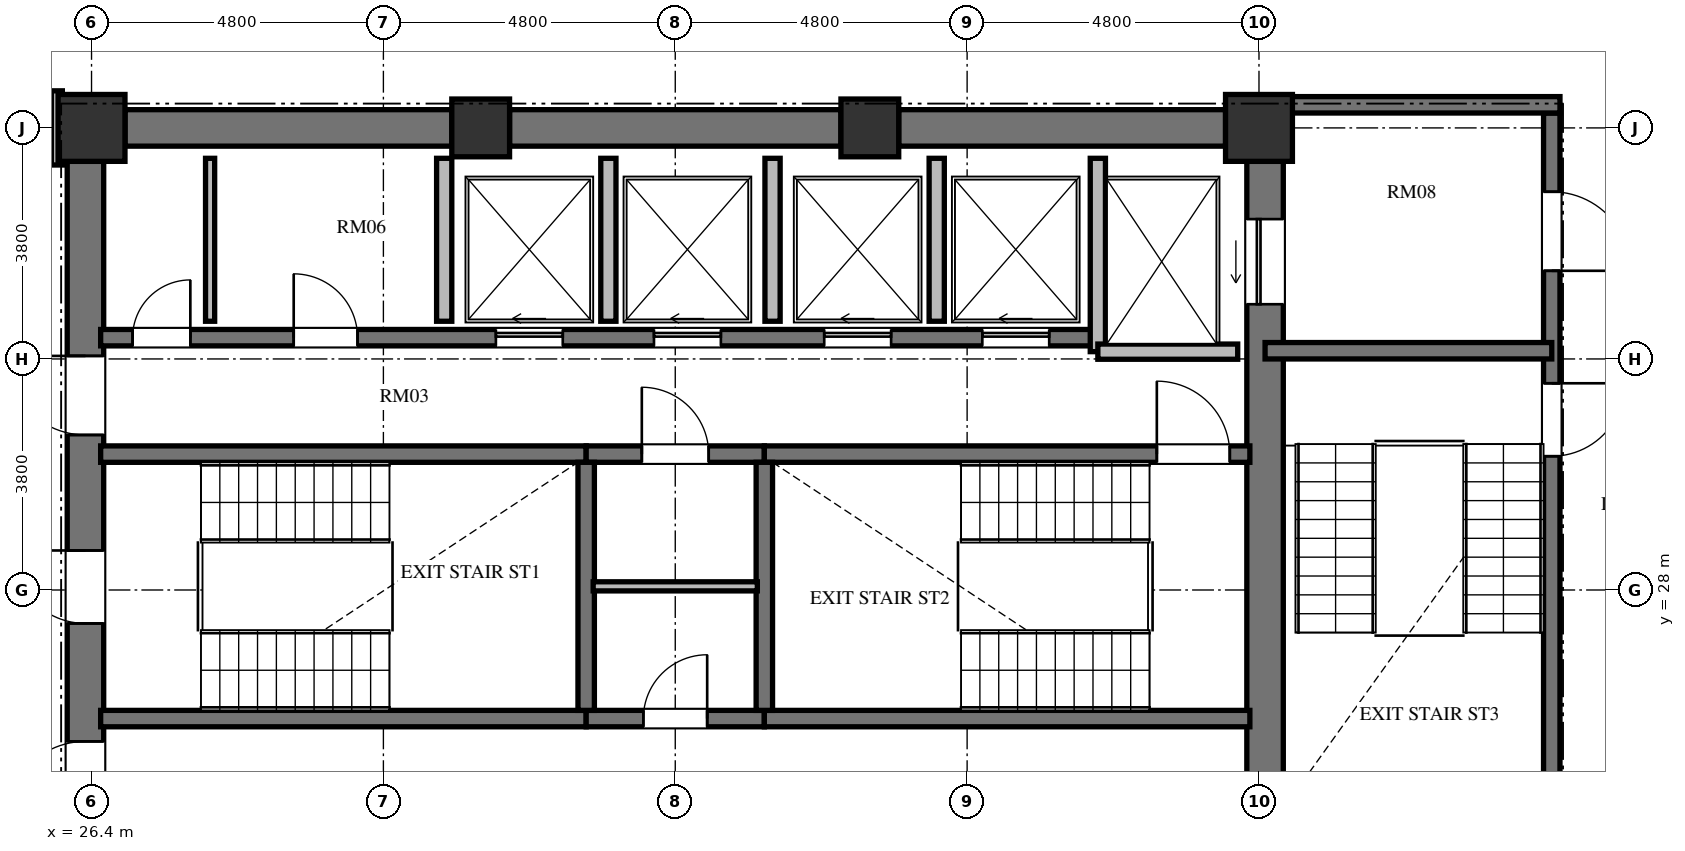
"""IFC4 building model, lengths in metres.
Left out: names, types, materials, properties, quantities, classifications, styles, units other than length and angle.
Written with IfcOpenShell. Run it as: python <this file> out.ifc"""

import sys

from ifc_helpers import new_model, si_unit, direction, frame, frame_2d, origin, origin_2d, place, context, subcontext, project, spatial, rectangle, extrude, element, fill, save


model = new_model("IFC4")
c1 = context("Model", 3, precision=1e-05, world=origin(), true_north=direction((0.0, 1.0)))
c2 = subcontext(c1, "Body", "Model", "MODEL_VIEW")
j1 = project(units=[si_unit("LENGTHUNIT", "METRE"), si_unit("PLANEANGLEUNIT", "RADIAN")], contexts=[c1])
p1 = place(None, origin())
s1 = spatial("IfcSite", under=j1, at=p1, CompositionType="ELEMENT")
p2 = place(p1, origin())
s2 = spatial("IfcBuilding", under=s1, at=p2, CompositionType="ELEMENT")
p3 = place(p2, frame((0.0, 0.0, 178.416)))
s3 = spatial("IfcBuildingStorey", under=s2, at=p3, CompositionType="ELEMENT", Elevation=178.416)
p4 = place(p3, frame((45.6, 35.6, 0.0), z_axis=(0.0, 0.0, 1.0), x_axis=(1.0, 0.0, 0.0)))
e1 = element("IfcColumn", 1, at=p4, inside=s3, PredefinedType="COLUMN", context=c2, shape_type="SweptSolid", body=[
    extrude(rectangle(XDim=1.1, YDim=1.1, at=origin_2d()), origin(), (0.0, 0.0, 1.0), 3.648),
])
for number, where, z_axis, x_axis in (
    (2, (39.2, 35.6, 0.0), (0.0, 0.0, 1.0), (1.0, 0.0, 0.0)),
    (3, (32.8, 35.6, 0.0), (0.0, 0.0, 1.0), (1.0, 0.0, 0.0)),
):
    element("IfcColumn", number, at=place(p3, frame(where, z_axis=z_axis, x_axis=x_axis)), inside=s3, PredefinedType="COLUMN", context=c2, shape_type="SweptSolid", body=[
        extrude(rectangle(XDim=0.95, YDim=0.95, at=origin_2d()), origin(), (0.0, 0.0, 1.0), 3.648),
    ])
p5 = place(p3, frame((26.4, 35.6, 0.0), z_axis=(0.0, 0.0, 1.0), x_axis=(1.0, 0.0, 0.0)))
e4 = element("IfcColumn", 4, at=p5, inside=s3, PredefinedType="COLUMN", context=c2, shape_type="SweptSolid", body=[
    extrude(rectangle(XDim=1.1, YDim=1.1, at=origin_2d()), origin(), (0.0, 0.0, 1.0), 3.648),
])
p6 = place(p3, frame((26.3, 20.95, 0.0), z_axis=(0.0, 0.0, 1.0), x_axis=(0.0, 1.0, 0.0)))
e5 = element("IfcWall", 5, at=p6, inside=s3, PredefinedType="SHEAR", context=c2, shape_type="SweptSolid", body=[
    extrude(rectangle(XDim=14.1, YDim=0.6, at=frame_2d((7.05, 0.0))), origin(), (0.0, 0.0, 1.0), 3.648),
])
p7 = place(p6, frame((6.5, 0.0, 0.0)))
e6 = element("IfcOpeningElement", 6, at=p7, cuts=e5, PredefinedType="OPENING", context=c2, shape_type="SweptSolid", body=[
    extrude(rectangle(XDim=1.2, YDim=2.15, at=frame_2d((0.6, 1.075))), frame((0.0, 0.31, 0.0), z_axis=(0.0, -1.0, 0.0), x_axis=(1.0, 0.0, 0.0)), (0.0, 0.0, 1.0), 0.62),
])
p8 = place(p6, frame((9.6, 0.0, 0.0)))
e7 = element("IfcOpeningElement", 7, at=p8, cuts=e5, PredefinedType="OPENING", context=c2, shape_type="SweptSolid", body=[
    extrude(rectangle(XDim=1.3, YDim=2.2, at=frame_2d((0.65, 1.1))), frame((0.0, 0.31, 0.0), z_axis=(0.0, -1.0, 0.0), x_axis=(1.0, 0.0, 0.0)), (0.0, 0.0, 1.0), 0.62),
])
p9 = place(p6, frame((3.26, 0.0, 0.0)))
e8 = element("IfcOpeningElement", 8, at=p9, cuts=e5, PredefinedType="OPENING", context=c2, shape_type="SweptSolid", body=[
    extrude(rectangle(XDim=1.3, YDim=2.2, at=frame_2d((0.65, 1.1))), frame((0.0, 0.31, 0.0), z_axis=(0.0, -1.0, 0.0), x_axis=(1.0, 0.0, 0.0)), (0.0, 0.0, 1.0), 0.62),
])
p10 = place(p3, frame((45.7, 20.95, 0.0), z_axis=(0.0, 0.0, 1.0), x_axis=(0.0, 1.0, 0.0)))
e9 = element("IfcWall", 9, at=p10, inside=s3, PredefinedType="SHEAR", context=c2, shape_type="SweptSolid", body=[
    extrude(rectangle(XDim=14.1, YDim=0.6, at=frame_2d((7.05, 0.0))), origin(), (0.0, 0.0, 1.0), 3.648),
])
p11 = place(p10, frame((11.75, 0.0, 0.0)))
e10 = element("IfcOpeningElement", 10, at=p11, cuts=e9, PredefinedType="OPENING", context=c2, shape_type="SweptSolid", body=[
    extrude(rectangle(XDim=1.4, YDim=2.3, at=frame_2d((0.7, 1.15))), frame((0.0, 0.31, 0.0), z_axis=(0.0, -1.0, 0.0), x_axis=(1.0, 0.0, 0.0)), (0.0, 0.0, 1.0), 0.62),
])
p12 = place(p10, frame((0.95, 0.0, 0.0)))
e11 = element("IfcOpeningElement", 11, at=p12, cuts=e9, PredefinedType="OPENING", context=c2, shape_type="SweptSolid", body=[
    extrude(rectangle(XDim=1.4, YDim=2.3, at=frame_2d((0.7, 1.15))), frame((0.0, 0.31, 0.0), z_axis=(0.0, -1.0, 0.0), x_axis=(1.0, 0.0, 0.0)), (0.0, 0.0, 1.0), 0.62),
])
p13 = place(p3, frame((26.95, 35.6, 0.0), z_axis=(0.0, 0.0, 1.0), x_axis=(1.0, 0.0, 0.0)))
e12 = element("IfcWall", 12, at=p13, inside=s3, PredefinedType="SHEAR", context=c2, shape_type="SweptSolid", body=[
    extrude(rectangle(XDim=5.375, YDim=0.6, at=frame_2d((2.688, 0.0))), origin(), (0.0, 0.0, 1.0), 3.648),
])
p14 = place(p3, frame((33.275, 35.6, 0.0), z_axis=(0.0, 0.0, 1.0), x_axis=(1.0, 0.0, 0.0)))
e13 = element("IfcWall", 13, at=p14, inside=s3, PredefinedType="SHEAR", context=c2, shape_type="SweptSolid", body=[
    extrude(rectangle(XDim=5.45, YDim=0.6, at=frame_2d((2.725, 0.0))), origin(), (0.0, 0.0, 1.0), 3.648),
])
p15 = place(p3, frame((39.675, 35.6, 0.0), z_axis=(0.0, 0.0, 1.0), x_axis=(1.0, 0.0, 0.0)))
e14 = element("IfcWall", 14, at=p15, inside=s3, PredefinedType="SHEAR", context=c2, shape_type="SweptSolid", body=[
    extrude(rectangle(XDim=5.375, YDim=0.6, at=frame_2d((2.688, 0.0))), origin(), (0.0, 0.0, 1.0), 3.648),
])
p16 = place(p3, frame((26.55, 30.235, 0.0), z_axis=(0.0, 0.0, 1.0), x_axis=(1.0, 0.0, 0.0)))
e15 = element("IfcWall", 15, at=p16, inside=s3, PredefinedType="SHEAR", context=c2, shape_type="SweptSolid", body=[
    extrude(rectangle(XDim=7.985, YDim=0.27, at=frame_2d((3.992, 0.0))), origin(), (0.0, 0.0, 1.0), 3.648),
])
p17 = place(p3, frame((34.535, 30.235, 0.0), z_axis=(0.0, 0.0, 1.0), x_axis=(1.0, 0.0, 0.0)))
e16 = element("IfcWall", 16, at=p17, inside=s3, PredefinedType="SHEAR", context=c2, shape_type="SweptSolid", body=[
    extrude(rectangle(XDim=2.93, YDim=0.27, at=frame_2d((1.465, 0.0))), origin(), (0.0, 0.0, 1.0), 3.648),
])
p18 = place(p17, frame((0.915, 0.0, 0.0)))
e17 = element("IfcOpeningElement", 17, at=p18, cuts=e16, PredefinedType="OPENING", context=c2, shape_type="SweptSolid", body=[
    extrude(rectangle(XDim=1.1, YDim=2.15, at=frame_2d((0.55, 1.075))), frame((0.0, 0.145, 0.0), z_axis=(0.0, -1.0, 0.0), x_axis=(1.0, 0.0, 0.0)), (0.0, 0.0, 1.0), 0.29),
])
p19 = place(p3, frame((37.465, 30.235, 0.0), z_axis=(0.0, 0.0, 1.0), x_axis=(1.0, 0.0, 0.0)))
e18 = element("IfcWall", 18, at=p19, inside=s3, PredefinedType="SHEAR", context=c2, shape_type="SweptSolid", body=[
    extrude(rectangle(XDim=7.985, YDim=0.27, at=frame_2d((3.992, 0.0))), origin(), (0.0, 0.0, 1.0), 3.648),
])
p20 = place(p19, frame((6.455, 0.0, 0.0)))
e19 = element("IfcOpeningElement", 19, at=p20, cuts=e18, PredefinedType="OPENING", context=c2, shape_type="SweptSolid", body=[
    extrude(rectangle(XDim=1.2, YDim=2.15, at=frame_2d((0.6, 1.075))), frame((0.0, 0.145, 0.0), z_axis=(0.0, -1.0, 0.0), x_axis=(1.0, 0.0, 0.0)), (0.0, 0.0, 1.0), 0.29),
])
p21 = place(p3, frame((26.55, 25.885, 0.0), z_axis=(0.0, 0.0, 1.0), x_axis=(1.0, 0.0, 0.0)))
e20 = element("IfcWall", 20, at=p21, inside=s3, PredefinedType="SHEAR", context=c2, shape_type="SweptSolid", body=[
    extrude(rectangle(XDim=7.985, YDim=0.27, at=frame_2d((3.992, 0.0))), origin(), (0.0, 0.0, 1.0), 3.648),
])
p22 = place(p3, frame((34.535, 25.885, 0.0), z_axis=(0.0, 0.0, 1.0), x_axis=(1.0, 0.0, 0.0)))
e21 = element("IfcWall", 21, at=p22, inside=s3, PredefinedType="SHEAR", context=c2, shape_type="SweptSolid", body=[
    extrude(rectangle(XDim=2.93, YDim=0.27, at=frame_2d((1.465, 0.0))), origin(), (0.0, 0.0, 1.0), 3.648),
])
p23 = place(p22, frame((0.94, 0.0, 0.0)))
e22 = element("IfcOpeningElement", 22, at=p23, cuts=e21, PredefinedType="OPENING", context=c2, shape_type="SweptSolid", body=[
    extrude(rectangle(XDim=1.05, YDim=2.15, at=frame_2d((0.525, 1.075))), frame((0.0, 0.145, 0.0), z_axis=(0.0, -1.0, 0.0), x_axis=(1.0, 0.0, 0.0)), (0.0, 0.0, 1.0), 0.29),
])
p24 = place(p3, frame((37.465, 25.885, 0.0), z_axis=(0.0, 0.0, 1.0), x_axis=(1.0, 0.0, 0.0)))
e23 = element("IfcWall", 23, at=p24, inside=s3, PredefinedType="SHEAR", context=c2, shape_type="SweptSolid", body=[
    extrude(rectangle(XDim=7.985, YDim=0.27, at=frame_2d((3.992, 0.0))), origin(), (0.0, 0.0, 1.0), 3.648),
])
for number, where, z_axis, x_axis in (
    (24, (34.535, 26.02, 0.0), (0.0, 0.0, 1.0), (0.0, 1.0, 0.0)),
    (25, (37.465, 26.02, 0.0), (0.0, 0.0, 1.0), (0.0, 1.0, 0.0)),
):
    element("IfcWall", number, at=place(p3, frame(where, z_axis=z_axis, x_axis=x_axis)), inside=s3, PredefinedType="SHEAR", context=c2, shape_type="SweptSolid", body=[
        extrude(rectangle(XDim=4.08, YDim=0.27, at=frame_2d((2.04, 0.0))), origin(), (0.0, 0.0, 1.0), 3.648),
    ])
p25 = place(p3, frame((34.65, 28.06, 0.0), z_axis=(0.0, 0.0, 1.0), x_axis=(1.0, 0.0, 0.0)))
e26 = element("IfcWall", 26, at=p25, inside=s3, PredefinedType="PARTITIONING", context=c2, shape_type="SweptSolid", body=[
    extrude(rectangle(XDim=2.7, YDim=0.15, at=frame_2d((1.35, 0.0))), origin(), (0.0, 0.0, 1.0), 3.428),
])
p26 = place(p3, frame((26.55, 32.15, 0.0), z_axis=(0.0, 0.0, 1.0), x_axis=(1.0, 0.0, 0.0)))
e27 = element("IfcWall", 27, at=p26, inside=s3, PredefinedType="SHEAR", context=c2, shape_type="SweptSolid", body=[
    extrude(rectangle(XDim=16.4, YDim=0.27, at=frame_2d((8.2, 0.0))), origin(), (0.0, 0.0, 1.0), 3.648),
])
p27 = place(p26, frame((0.525, 0.0, 0.0)))
e28 = element("IfcOpeningElement", 28, at=p27, cuts=e27, PredefinedType="OPENING", context=c2, shape_type="SweptSolid", body=[
    extrude(rectangle(XDim=0.95, YDim=2.1, at=frame_2d((0.475, 1.05))), frame((0.0, 0.145, 0.0), z_axis=(0.0, -1.0, 0.0), x_axis=(1.0, 0.0, 0.0)), (0.0, 0.0, 1.0), 0.29),
])
p28 = place(p26, frame((3.175, 0.0, 0.0)))
e29 = element("IfcOpeningElement", 29, at=p28, cuts=e27, PredefinedType="OPENING", context=c2, shape_type="SweptSolid", body=[
    extrude(rectangle(XDim=1.05, YDim=2.15, at=frame_2d((0.525, 1.075))), frame((0.0, 0.145, 0.0), z_axis=(0.0, -1.0, 0.0), x_axis=(1.0, 0.0, 0.0)), (0.0, 0.0, 1.0), 0.29),
])
p29 = place(p26, frame((6.5, 0.0, 0.0)))
e30 = element("IfcOpeningElement", 30, at=p29, cuts=e27, PredefinedType="OPENING", context=c2, shape_type="SweptSolid", body=[
    extrude(rectangle(XDim=1.1, YDim=2.2, at=frame_2d((0.55, 1.1))), frame((0.0, 0.145, 0.0), z_axis=(0.0, -1.0, 0.0), x_axis=(1.0, 0.0, 0.0)), (0.0, 0.0, 1.0), 0.29),
])
p30 = place(p26, frame((9.1, 0.0, 0.0)))
e31 = element("IfcOpeningElement", 31, at=p30, cuts=e27, PredefinedType="OPENING", context=c2, shape_type="SweptSolid", body=[
    extrude(rectangle(XDim=1.1, YDim=2.2, at=frame_2d((0.55, 1.1))), frame((0.0, 0.145, 0.0), z_axis=(0.0, -1.0, 0.0), x_axis=(1.0, 0.0, 0.0)), (0.0, 0.0, 1.0), 0.29),
])
p31 = place(p26, frame((11.9, 0.0, 0.0)))
e32 = element("IfcOpeningElement", 32, at=p31, cuts=e27, PredefinedType="OPENING", context=c2, shape_type="SweptSolid", body=[
    extrude(rectangle(XDim=1.1, YDim=2.2, at=frame_2d((0.55, 1.1))), frame((0.0, 0.145, 0.0), z_axis=(0.0, -1.0, 0.0), x_axis=(1.0, 0.0, 0.0)), (0.0, 0.0, 1.0), 0.29),
])
p32 = place(p26, frame((14.5, 0.0, 0.0)))
e33 = element("IfcOpeningElement", 33, at=p32, cuts=e27, PredefinedType="OPENING", context=c2, shape_type="SweptSolid", body=[
    extrude(rectangle(XDim=1.1, YDim=2.2, at=frame_2d((0.55, 1.1))), frame((0.0, 0.145, 0.0), z_axis=(0.0, -1.0, 0.0), x_axis=(1.0, 0.0, 0.0)), (0.0, 0.0, 1.0), 0.29),
])
p33 = place(p3, frame((42.95, 31.92, 0.0), z_axis=(0.0, 0.0, 1.0), x_axis=(0.0, 1.0, 0.0)))
e34 = element("IfcWall", 34, at=p33, inside=s3, PredefinedType="SOLIDWALL", context=c2, shape_type="SweptSolid", body=[
    extrude(rectangle(XDim=3.18, YDim=0.25, at=frame_2d((1.59, 0.0))), origin(), (0.0, 0.0, 1.0), 3.428),
])
p34 = place(p3, frame((42.95, 31.92, 0.0), z_axis=(0.0, 0.0, 1.0), x_axis=(1.0, 0.0, 0.0)))
e35 = element("IfcWall", 35, at=p34, inside=s3, PredefinedType="SOLIDWALL", context=c2, shape_type="SweptSolid", body=[
    extrude(rectangle(XDim=2.3, YDim=0.25, at=frame_2d((1.15, 0.0))), origin(), (0.0, 0.0, 1.0), 3.428),
])
for number, where, z_axis, x_axis in (
    (36, (32.2, 32.42, 0.0), (0.0, 0.0, 1.0), (0.0, 1.0, 0.0)),
    (37, (34.9, 32.42, 0.0), (0.0, 0.0, 1.0), (0.0, 1.0, 0.0)),
    (38, (37.6, 32.42, 0.0), (0.0, 0.0, 1.0), (0.0, 1.0, 0.0)),
    (39, (40.3, 32.42, 0.0), (0.0, 0.0, 1.0), (0.0, 1.0, 0.0)),
):
    element("IfcWall", number, at=place(p3, frame(where, z_axis=z_axis, x_axis=x_axis)), inside=s3, PredefinedType="SOLIDWALL", context=c2, shape_type="SweptSolid", body=[
        extrude(rectangle(XDim=2.68, YDim=0.25, at=frame_2d((1.34, 0.0))), origin(), (0.0, 0.0, 1.0), 3.428),
    ])
p35 = place(p3, frame((28.35, 32.42, 0.0), z_axis=(0.0, 0.0, 1.0), x_axis=(0.0, 1.0, 0.0)))
e40 = element("IfcWall", 40, at=p35, inside=s3, PredefinedType="PARTITIONING", context=c2, shape_type="SweptSolid", body=[
    extrude(rectangle(XDim=2.68, YDim=0.15, at=frame_2d((1.34, 0.0))), origin(), (0.0, 0.0, 1.0), 3.428),
])
p36 = place(p3, frame((50.415, 35.845, 0.0), z_axis=(0.0, 0.0, 1.0), x_axis=(0.0, -1.0, 0.0)))
e41 = element("IfcWall", 41, at=p36, inside=s3, PredefinedType="SHEAR", context=c2, shape_type="SweptSolid", body=[
    extrude(rectangle(XDim=15.825, YDim=0.27, at=frame_2d((7.913, 0.0))), origin(), (0.0, 0.0, 1.0), 3.648),
])
p37 = place(p36, frame((4.445, 0.0, 0.0)))
e42 = element("IfcOpeningElement", 42, at=p37, cuts=e41, PredefinedType="OPENING", context=c2, shape_type="SweptSolid", body=[
    extrude(rectangle(XDim=1.2, YDim=2.15, at=frame_2d((0.6, 1.075))), frame((0.0, 0.145, 0.0), z_axis=(0.0, -1.0, 0.0), x_axis=(1.0, 0.0, 0.0)), (0.0, 0.0, 1.0), 0.29),
])
p38 = place(p36, frame((1.295, 0.0, 0.0)))
e43 = element("IfcOpeningElement", 43, at=p38, cuts=e41, PredefinedType="OPENING", context=c2, shape_type="SweptSolid", body=[
    extrude(rectangle(XDim=1.3, YDim=2.2, at=frame_2d((0.65, 1.1))), frame((0.0, 0.145, 0.0), z_axis=(0.0, -1.0, 0.0), x_axis=(1.0, 0.0, 0.0)), (0.0, 0.0, 1.0), 0.29),
])
p39 = place(p36, frame((13.095, 0.0, 0.0)))
e44 = element("IfcOpeningElement", 44, at=p39, cuts=e41, PredefinedType="OPENING", context=c2, shape_type="SweptSolid", body=[
    extrude(rectangle(XDim=1.3, YDim=2.2, at=frame_2d((0.65, 1.1))), frame((0.0, 0.145, 0.0), z_axis=(0.0, -1.0, 0.0), x_axis=(1.0, 0.0, 0.0)), (0.0, 0.0, 1.0), 0.29),
])
p40 = place(p3, frame((46.0, 35.98, 0.0), z_axis=(0.0, 0.0, 1.0), x_axis=(1.0, 0.0, 0.0)))
e45 = element("IfcWall", 45, at=p40, inside=s3, PredefinedType="SHEAR", context=c2, shape_type="SweptSolid", body=[
    extrude(rectangle(XDim=4.55, YDim=0.27, at=frame_2d((2.275, 0.0))), origin(), (0.0, 0.0, 1.0), 3.648),
])
p41 = place(p3, frame((45.7, 31.935, 0.0), z_axis=(0.0, 0.0, 1.0), x_axis=(1.0, 0.0, 0.0)))
e46 = element("IfcWall", 46, at=p41, inside=s3, PredefinedType="SHEAR", context=c2, shape_type="SweptSolid", body=[
    extrude(rectangle(XDim=4.715, YDim=0.27, at=frame_2d((2.357, 0.0))), origin(), (0.0, 0.0, 1.0), 3.648),
])
p42 = place(p3, frame((25.83, 36.21, 0.0), z_axis=(0.0, 0.0, 1.0), x_axis=(0.0, -1.0, 0.0)))
e47 = element("IfcWall", 47, at=p42, inside=s3, PredefinedType="PARTITIONING", context=c2, shape_type="SweptSolid", body=[
    extrude(rectangle(XDim=1.22, YDim=0.18, at=frame_2d((0.61, 0.0))), origin(), (0.0, 0.0, 1.0), 3.428),
])
p43 = place(p7, origin())
e48 = element("IfcDoor", 48, at=p43, inside=s3, OperationType="SINGLE_SWING_RIGHT", PredefinedType="DOOR", context=c2, shape_type="SweptSolid", body=[
    extrude(rectangle(XDim=1.2, YDim=2.15, at=frame_2d((0.6, 1.075))), frame((0.0, 0.025, 0.0), z_axis=(0.0, -1.0, 0.0), x_axis=(1.0, 0.0, 0.0)), (0.0, 0.0, 1.0), 0.05),
])
fill(e6, e48)
p44 = place(p20, origin())
e49 = element("IfcDoor", 49, at=p44, inside=s3, OperationType="SINGLE_SWING_LEFT", PredefinedType="DOOR", context=c2, shape_type="SweptSolid", body=[
    extrude(rectangle(XDim=1.2, YDim=2.15, at=frame_2d((0.6, 1.075))), frame((0.0, 0.025, 0.0), z_axis=(0.0, -1.0, 0.0), x_axis=(1.0, 0.0, 0.0)), (0.0, 0.0, 1.0), 0.05),
])
fill(e19, e49)
p45 = place(p23, origin())
e50 = element("IfcDoor", 50, at=p45, inside=s3, OperationType="SINGLE_SWING_RIGHT", PredefinedType="DOOR", context=c2, shape_type="SweptSolid", body=[
    extrude(rectangle(XDim=1.05, YDim=2.15, at=frame_2d((0.525, 1.075))), frame((0.0, 0.025, 0.0), z_axis=(0.0, -1.0, 0.0), x_axis=(1.0, 0.0, 0.0)), (0.0, 0.0, 1.0), 0.05),
])
fill(e22, e50)
p46 = place(p18, origin())
e51 = element("IfcDoor", 51, at=p46, inside=s3, OperationType="SINGLE_SWING_LEFT", PredefinedType="DOOR", context=c2, shape_type="SweptSolid", body=[
    extrude(rectangle(XDim=1.1, YDim=2.15, at=frame_2d((0.55, 1.075))), frame((0.0, 0.025, 0.0), z_axis=(0.0, -1.0, 0.0), x_axis=(1.0, 0.0, 0.0)), (0.0, 0.0, 1.0), 0.05),
])
fill(e17, e51)
p47 = place(p8, origin())
e52 = element("IfcDoor", 52, at=p47, inside=s3, OperationType="SINGLE_SWING_RIGHT", PredefinedType="DOOR", context=c2, shape_type="SweptSolid", body=[
    extrude(rectangle(XDim=1.3, YDim=2.2, at=frame_2d((0.65, 1.1))), frame((0.0, 0.025, 0.0), z_axis=(0.0, -1.0, 0.0), x_axis=(1.0, 0.0, 0.0)), (0.0, 0.0, 1.0), 0.05),
])
fill(e7, e52)
p48 = place(p9, origin())
e53 = element("IfcDoor", 53, at=p48, inside=s3, OperationType="SINGLE_SWING_LEFT", PredefinedType="DOOR", context=c2, shape_type="SweptSolid", body=[
    extrude(rectangle(XDim=1.3, YDim=2.2, at=frame_2d((0.65, 1.1))), frame((0.0, 0.025, 0.0), z_axis=(0.0, -1.0, 0.0), x_axis=(1.0, 0.0, 0.0)), (0.0, 0.0, 1.0), 0.05),
])
fill(e8, e53)
p49 = place(p27, origin())
e54 = element("IfcDoor", 54, at=p49, inside=s3, OperationType="SINGLE_SWING_RIGHT", PredefinedType="DOOR", context=c2, shape_type="SweptSolid", body=[
    extrude(rectangle(XDim=0.95, YDim=2.1, at=frame_2d((0.475, 1.05))), frame((0.0, 0.025, 0.0), z_axis=(0.0, -1.0, 0.0), x_axis=(1.0, 0.0, 0.0)), (0.0, 0.0, 1.0), 0.05),
])
fill(e28, e54)
p50 = place(p28, origin())
e55 = element("IfcDoor", 55, at=p50, inside=s3, OperationType="SINGLE_SWING_LEFT", PredefinedType="DOOR", context=c2, shape_type="SweptSolid", body=[
    extrude(rectangle(XDim=1.05, YDim=2.15, at=frame_2d((0.525, 1.075))), frame((0.0, 0.025, 0.0), z_axis=(0.0, -1.0, 0.0), x_axis=(1.0, 0.0, 0.0)), (0.0, 0.0, 1.0), 0.05),
])
fill(e29, e55)
p51 = place(p29, origin())
e56 = element("IfcDoor", 56, at=p51, inside=s3, OperationType="SLIDING_TO_LEFT", PredefinedType="DOOR", context=c2, shape_type="SweptSolid", body=[
    extrude(rectangle(XDim=1.1, YDim=2.2, at=frame_2d((0.55, 1.1))), frame((0.0, 0.025, 0.0), z_axis=(0.0, -1.0, 0.0), x_axis=(1.0, 0.0, 0.0)), (0.0, 0.0, 1.0), 0.05),
])
fill(e30, e56)
p52 = place(p30, origin())
e57 = element("IfcDoor", 57, at=p52, inside=s3, OperationType="SLIDING_TO_LEFT", PredefinedType="DOOR", context=c2, shape_type="SweptSolid", body=[
    extrude(rectangle(XDim=1.1, YDim=2.2, at=frame_2d((0.55, 1.1))), frame((0.0, 0.025, 0.0), z_axis=(0.0, -1.0, 0.0), x_axis=(1.0, 0.0, 0.0)), (0.0, 0.0, 1.0), 0.05),
])
fill(e31, e57)
p53 = place(p31, origin())
e58 = element("IfcDoor", 58, at=p53, inside=s3, OperationType="SLIDING_TO_LEFT", PredefinedType="DOOR", context=c2, shape_type="SweptSolid", body=[
    extrude(rectangle(XDim=1.1, YDim=2.2, at=frame_2d((0.55, 1.1))), frame((0.0, 0.025, 0.0), z_axis=(0.0, -1.0, 0.0), x_axis=(1.0, 0.0, 0.0)), (0.0, 0.0, 1.0), 0.05),
])
fill(e32, e58)
p54 = place(p32, origin())
e59 = element("IfcDoor", 59, at=p54, inside=s3, OperationType="SLIDING_TO_LEFT", PredefinedType="DOOR", context=c2, shape_type="SweptSolid", body=[
    extrude(rectangle(XDim=1.1, YDim=2.2, at=frame_2d((0.55, 1.1))), frame((0.0, 0.025, 0.0), z_axis=(0.0, -1.0, 0.0), x_axis=(1.0, 0.0, 0.0)), (0.0, 0.0, 1.0), 0.05),
])
fill(e33, e59)
p55 = place(p11, origin())
e60 = element("IfcDoor", 60, at=p55, inside=s3, OperationType="SLIDING_TO_LEFT", PredefinedType="DOOR", context=c2, shape_type="SweptSolid", body=[
    extrude(rectangle(XDim=1.4, YDim=2.3, at=frame_2d((0.7, 1.15))), frame((0.0, 0.025, 0.0), z_axis=(0.0, -1.0, 0.0), x_axis=(1.0, 0.0, 0.0)), (0.0, 0.0, 1.0), 0.05),
])
fill(e10, e60)
p56 = place(p37, origin())
e61 = element("IfcDoor", 61, at=p56, inside=s3, OperationType="SINGLE_SWING_LEFT", PredefinedType="DOOR", context=c2, shape_type="SweptSolid", body=[
    extrude(rectangle(XDim=1.2, YDim=2.15, at=frame_2d((0.6, 1.075))), frame((0.0, 0.025, 0.0), z_axis=(0.0, -1.0, 0.0), x_axis=(1.0, 0.0, 0.0)), (0.0, 0.0, 1.0), 0.05),
])
fill(e42, e61)
p57 = place(p38, origin())
e62 = element("IfcDoor", 62, at=p57, inside=s3, OperationType="SINGLE_SWING_RIGHT", PredefinedType="DOOR", context=c2, shape_type="SweptSolid", body=[
    extrude(rectangle(XDim=1.3, YDim=2.2, at=frame_2d((0.65, 1.1))), frame((0.0, 0.025, 0.0), z_axis=(0.0, -1.0, 0.0), x_axis=(1.0, 0.0, 0.0)), (0.0, 0.0, 1.0), 0.05),
])
fill(e43, e62)
save(model, sys.argv[1])
